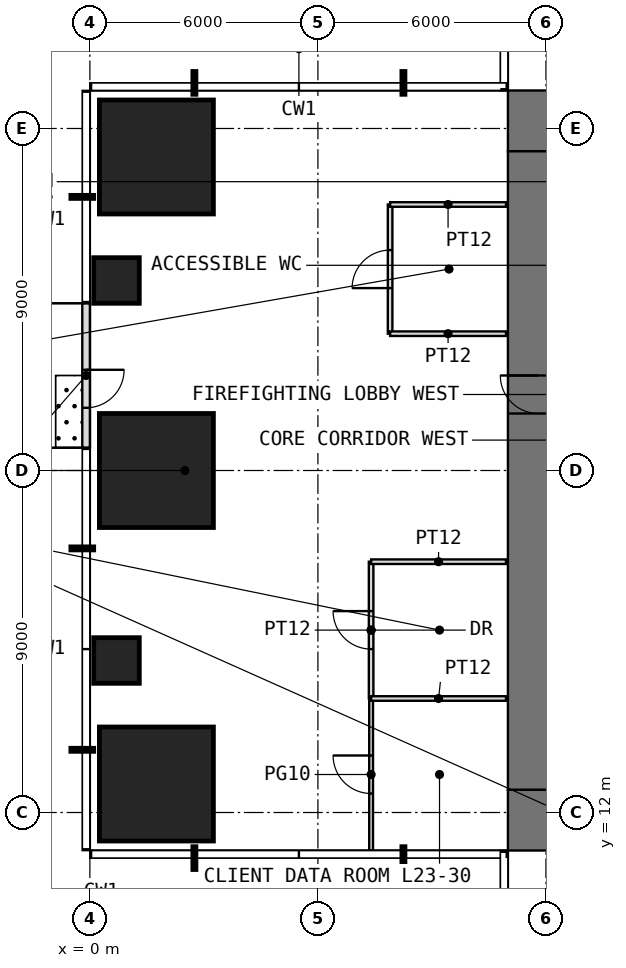
"""IFC4 building model, lengths in metres.
Left out: names, types, materials, properties, quantities, classifications, styles, units other than length and angle.
Written with IfcOpenShell. Run it as: python <this file> out.ifc"""

import sys

from ifc_helpers import new_model, si_unit, direction, frame, frame_2d, origin, origin_2d, place, context, subcontext, project, spatial, rectangle, extrude, element, fill, save


model = new_model("IFC4")
c1 = context("Model", 3, precision=1e-05, world=origin(), true_north=direction((0.0, 1.0)))
c2 = subcontext(c1, "Body", "Model", "MODEL_VIEW")
j1 = project(units=[si_unit("LENGTHUNIT", "METRE"), si_unit("PLANEANGLEUNIT", "RADIAN")], contexts=[c1])
p1 = place(None, origin())
s1 = spatial("IfcSite", under=j1, at=p1, CompositionType="ELEMENT")
p2 = place(p1, origin())
s2 = spatial("IfcBuilding", under=s1, at=p2, CompositionType="ELEMENT")
p3 = place(p2, frame((0.0, 0.0, 100.5)))
s3 = spatial("IfcBuildingStorey", under=s2, at=p3, CompositionType="ELEMENT", Elevation=100.5)
p4 = place(p3, frame((1.75, 12.75, 0.0), z_axis=(0.0, 0.0, 1.0), x_axis=(1.0, 0.0, 0.0)))
e1 = element("IfcColumn", 1, at=p4, inside=s3, PredefinedType="COLUMN", context=c2, shape_type="SweptSolid", body=[
    extrude(rectangle(XDim=3.0, YDim=3.0, at=origin_2d()), origin(), (0.0, 0.0, 1.0), 4.0),
])
p5 = place(p3, frame((0.7, 16.0, 0.0), z_axis=(0.0, 0.0, 1.0), x_axis=(1.0, 0.0, 0.0)))
e2 = element("IfcColumn", 2, at=p5, inside=s3, PredefinedType="COLUMN", context=c2, shape_type="SweptSolid", body=[
    extrude(rectangle(XDim=1.2, YDim=1.2, at=origin_2d()), origin(), (0.0, 0.0, 1.0), 4.0),
])
p6 = place(p3, frame((1.75, 21.0, 0.0), z_axis=(0.0, 0.0, 1.0), x_axis=(1.0, 0.0, 0.0)))
e3 = element("IfcColumn", 3, at=p6, inside=s3, PredefinedType="COLUMN", context=c2, shape_type="SweptSolid", body=[
    extrude(rectangle(XDim=3.0, YDim=3.0, at=origin_2d()), origin(), (0.0, 0.0, 1.0), 4.0),
])
p7 = place(p3, frame((0.7, 26.0, 0.0), z_axis=(0.0, 0.0, 1.0), x_axis=(1.0, 0.0, 0.0)))
e4 = element("IfcColumn", 4, at=p7, inside=s3, PredefinedType="COLUMN", context=c2, shape_type="SweptSolid", body=[
    extrude(rectangle(XDim=1.2, YDim=1.2, at=origin_2d()), origin(), (0.0, 0.0, 1.0), 4.0),
])
p8 = place(p3, frame((1.75, 29.25, 0.0), z_axis=(0.0, 0.0, 1.0), x_axis=(1.0, 0.0, 0.0)))
e5 = element("IfcColumn", 5, at=p8, inside=s3, PredefinedType="COLUMN", context=c2, shape_type="SweptSolid", body=[
    extrude(rectangle(XDim=3.0, YDim=3.0, at=origin_2d()), origin(), (0.0, 0.0, 1.0), 4.0),
])
p9 = place(p3, frame((-0.1, 25.4, 0.0), z_axis=(0.0, 0.0, 1.0), x_axis=(0.0, -1.0, 0.0)))
e6 = element("IfcWall", 6, at=p9, inside=s3, PredefinedType="USERDEFINED", context=c2, shape_type="SweptSolid", body=[
    extrude(rectangle(XDim=3.8, YDim=0.2, at=frame_2d((1.9, 0.0))), origin(), (0.0, 0.0, 1.0), 3.75),
])
p10 = place(p9, frame((1.75, 0.0, 0.0)))
e7 = element("IfcOpeningElement", 7, at=p10, cuts=e6, PredefinedType="OPENING", context=c2, shape_type="SweptSolid", body=[
    extrude(rectangle(XDim=1.0, YDim=2.4, at=frame_2d((0.5, 1.2))), frame((0.0, 0.11, 0.0), z_axis=(0.0, -1.0, 0.0), x_axis=(1.0, 0.0, 0.0)), (0.0, 0.0, 1.0), 0.22),
])
p11 = place(p3, frame((11.0, 11.8, -0.05), z_axis=(0.0, 0.0, 1.0), x_axis=(1.0, 0.0, 0.0)))
e8 = element("IfcWall", 8, at=p11, inside=s3, PredefinedType="SHEAR", context=c2, shape_type="SweptSolid", body=[
    extrude(rectangle(XDim=20.0, YDim=1.6, at=frame_2d((10.0, 0.0))), origin(), (0.0, 0.0, 1.0), 4.0),
])
p12 = place(p11, frame((9.0, 0.0, 0.05)))
e9 = element("IfcOpeningElement", 9, at=p12, cuts=e8, PredefinedType="OPENING", context=c2, shape_type="SweptSolid", body=[
    extrude(rectangle(XDim=2.0, YDim=2.2, at=frame_2d((1.0, 1.1))), frame((0.0, 0.81, 0.0), z_axis=(0.0, -1.0, 0.0), x_axis=(1.0, 0.0, 0.0)), (0.0, 0.0, 1.0), 1.62),
])
p13 = place(p3, frame((11.0, 30.2, -0.05), z_axis=(0.0, 0.0, 1.0), x_axis=(1.0, 0.0, 0.0)))
e10 = element("IfcWall", 10, at=p13, inside=s3, PredefinedType="SHEAR", context=c2, shape_type="SweptSolid", body=[
    extrude(rectangle(XDim=20.0, YDim=1.6, at=frame_2d((10.0, 0.0))), origin(), (0.0, 0.0, 1.0), 4.0),
])
p14 = place(p13, frame((9.0, 0.0, 0.05)))
e11 = element("IfcOpeningElement", 11, at=p14, cuts=e10, PredefinedType="OPENING", context=c2, shape_type="SweptSolid", body=[
    extrude(rectangle(XDim=2.0, YDim=2.2, at=frame_2d((1.0, 1.1))), frame((0.0, 0.81, 0.0), z_axis=(0.0, -1.0, 0.0), x_axis=(1.0, 0.0, 0.0)), (0.0, 0.0, 1.0), 1.62),
])
p15 = place(p3, frame((11.8, 12.6, -0.05), z_axis=(0.0, 0.0, 1.0), x_axis=(0.0, 1.0, 0.0)))
e12 = element("IfcWall", 12, at=p15, inside=s3, PredefinedType="SHEAR", context=c2, shape_type="SweptSolid", body=[
    extrude(rectangle(XDim=16.8, YDim=1.6, at=frame_2d((8.4, 0.0))), origin(), (0.0, 0.0, 1.0), 4.0),
])
p16 = place(p15, frame((9.9, 0.0, 0.05)))
e13 = element("IfcOpeningElement", 13, at=p16, cuts=e12, PredefinedType="OPENING", context=c2, shape_type="SweptSolid", body=[
    extrude(rectangle(XDim=1.0, YDim=2.2, at=frame_2d((0.5, 1.1))), frame((0.0, 0.81, 0.0), z_axis=(0.0, -1.0, 0.0), x_axis=(1.0, 0.0, 0.0)), (0.0, 0.0, 1.0), 1.62),
])
p17 = place(p3, frame((7.4, 11.0, 0.0), z_axis=(0.0, 0.0, 1.0), x_axis=(0.0, 1.0, 0.0)))
e14 = element("IfcWall", 14, at=p17, inside=s3, PredefinedType="PARTITIONING", context=c2, shape_type="SweptSolid", body=[
    extrude(rectangle(XDim=4.0, YDim=0.1, at=frame_2d((2.0, 0.0))), origin(), (0.0, 0.0, 1.0), 3.75),
])
p18 = place(p17, frame((1.5, 0.0, 0.0)))
e15 = element("IfcOpeningElement", 15, at=p18, cuts=e14, PredefinedType="OPENING", context=c2, shape_type="SweptSolid", body=[
    extrude(rectangle(XDim=1.0, YDim=2.4, at=frame_2d((0.5, 1.2))), frame((0.0, 0.06, 0.0), z_axis=(0.0, -1.0, 0.0), x_axis=(1.0, 0.0, 0.0)), (0.0, 0.0, 1.0), 0.12),
])
p19 = place(p3, frame((7.4, 15.0, 0.0), z_axis=(0.0, 0.0, 1.0), x_axis=(0.0, 1.0, 0.0)))
e16 = element("IfcWall", 16, at=p19, inside=s3, PredefinedType="PARTITIONING", context=c2, shape_type="SweptSolid", body=[
    extrude(rectangle(XDim=3.6, YDim=0.12, at=frame_2d((1.8, 0.0))), origin(), (0.0, 0.0, 1.0), 3.75),
])
p20 = place(p19, frame((1.3, 0.0, 0.0)))
e17 = element("IfcOpeningElement", 17, at=p20, cuts=e16, PredefinedType="OPENING", context=c2, shape_type="SweptSolid", body=[
    extrude(rectangle(XDim=1.0, YDim=2.2, at=frame_2d((0.5, 1.1))), frame((0.0, 0.07, 0.0), z_axis=(0.0, -1.0, 0.0), x_axis=(1.0, 0.0, 0.0)), (0.0, 0.0, 1.0), 0.14),
])
for number, where, z_axis, x_axis in (
    (18, (7.4, 15.0, 0.0), (0.0, 0.0, 1.0), (1.0, 0.0, 0.0)),
    (19, (7.4, 18.6, 0.0), (0.0, 0.0, 1.0), (1.0, 0.0, 0.0)),
):
    element("IfcWall", number, at=place(p3, frame(where, z_axis=z_axis, x_axis=x_axis)), inside=s3, PredefinedType="PARTITIONING", context=c2, shape_type="SweptSolid", body=[
        extrude(rectangle(XDim=3.55, YDim=0.12, at=frame_2d((1.775, 0.0))), origin(), (0.0, 0.0, 1.0), 3.75),
    ])
p21 = place(p3, frame((7.9, 24.6, 0.0), z_axis=(0.0, 0.0, 1.0), x_axis=(0.0, 1.0, 0.0)))
e20 = element("IfcWall", 20, at=p21, inside=s3, PredefinedType="PARTITIONING", context=c2, shape_type="SweptSolid", body=[
    extrude(rectangle(XDim=3.4, YDim=0.12, at=frame_2d((1.7, 0.0))), origin(), (0.0, 0.0, 1.0), 3.75),
])
p22 = place(p21, frame((1.2, 0.0, 0.0)))
e21 = element("IfcOpeningElement", 21, at=p22, cuts=e20, PredefinedType="OPENING", context=c2, shape_type="SweptSolid", body=[
    extrude(rectangle(XDim=1.0, YDim=2.2, at=frame_2d((0.5, 1.1))), frame((0.0, 0.07, 0.0), z_axis=(0.0, -1.0, 0.0), x_axis=(1.0, 0.0, 0.0)), (0.0, 0.0, 1.0), 0.14),
])
for number, where, z_axis, x_axis in (
    (22, (7.9, 24.6, 0.0), (0.0, 0.0, 1.0), (1.0, 0.0, 0.0)),
    (23, (7.9, 28.0, 0.0), (0.0, 0.0, 1.0), (1.0, 0.0, 0.0)),
):
    element("IfcWall", number, at=place(p3, frame(where, z_axis=z_axis, x_axis=x_axis)), inside=s3, PredefinedType="PARTITIONING", context=c2, shape_type="SweptSolid", body=[
        extrude(rectangle(XDim=3.05, YDim=0.12, at=frame_2d((1.525, 0.0))), origin(), (0.0, 0.0, 1.0), 3.75),
    ])
p23 = place(p10, origin())
e24 = element("IfcDoor", 24, at=p23, inside=s3, OperationType="SINGLE_SWING_LEFT", PredefinedType="DOOR", context=c2, shape_type="SweptSolid", body=[
    extrude(rectangle(XDim=1.0, YDim=2.4, at=frame_2d((0.5, 1.2))), frame((0.0, 0.025, 0.0), z_axis=(0.0, -1.0, 0.0), x_axis=(1.0, 0.0, 0.0)), (0.0, 0.0, 1.0), 0.05),
])
fill(e7, e24)
p24 = place(p16, origin())
e25 = element("IfcDoor", 25, at=p24, inside=s3, OperationType="SINGLE_SWING_RIGHT", PredefinedType="DOOR", context=c2, shape_type="SweptSolid", body=[
    extrude(rectangle(XDim=1.0, YDim=2.2, at=frame_2d((0.5, 1.1))), frame((0.0, 0.025, 0.0), z_axis=(0.0, -1.0, 0.0), x_axis=(1.0, 0.0, 0.0)), (0.0, 0.0, 1.0), 0.05),
])
fill(e13, e25)
p25 = place(p18, origin())
e26 = element("IfcDoor", 26, at=p25, inside=s3, OperationType="SINGLE_SWING_RIGHT", PredefinedType="DOOR", context=c2, shape_type="SweptSolid", body=[
    extrude(rectangle(XDim=1.0, YDim=2.4, at=frame_2d((0.5, 1.2))), frame((0.0, 0.025, 0.0), z_axis=(0.0, -1.0, 0.0), x_axis=(1.0, 0.0, 0.0)), (0.0, 0.0, 1.0), 0.05),
])
fill(e15, e26)
p26 = place(p20, origin())
e27 = element("IfcDoor", 27, at=p26, inside=s3, OperationType="SINGLE_SWING_RIGHT", PredefinedType="DOOR", context=c2, shape_type="SweptSolid", body=[
    extrude(rectangle(XDim=1.0, YDim=2.2, at=frame_2d((0.5, 1.1))), frame((0.0, 0.025, 0.0), z_axis=(0.0, -1.0, 0.0), x_axis=(1.0, 0.0, 0.0)), (0.0, 0.0, 1.0), 0.05),
])
fill(e17, e27)
p27 = place(p22, origin())
e28 = element("IfcDoor", 28, at=p27, inside=s3, OperationType="SINGLE_SWING_LEFT", PredefinedType="DOOR", context=c2, shape_type="SweptSolid", body=[
    extrude(rectangle(XDim=1.0, YDim=2.2, at=frame_2d((0.5, 1.1))), frame((0.0, 0.025, 0.0), z_axis=(0.0, -1.0, 0.0), x_axis=(1.0, 0.0, 0.0)), (0.0, 0.0, 1.0), 0.05),
])
fill(e21, e28)
save(model, sys.argv[1])
